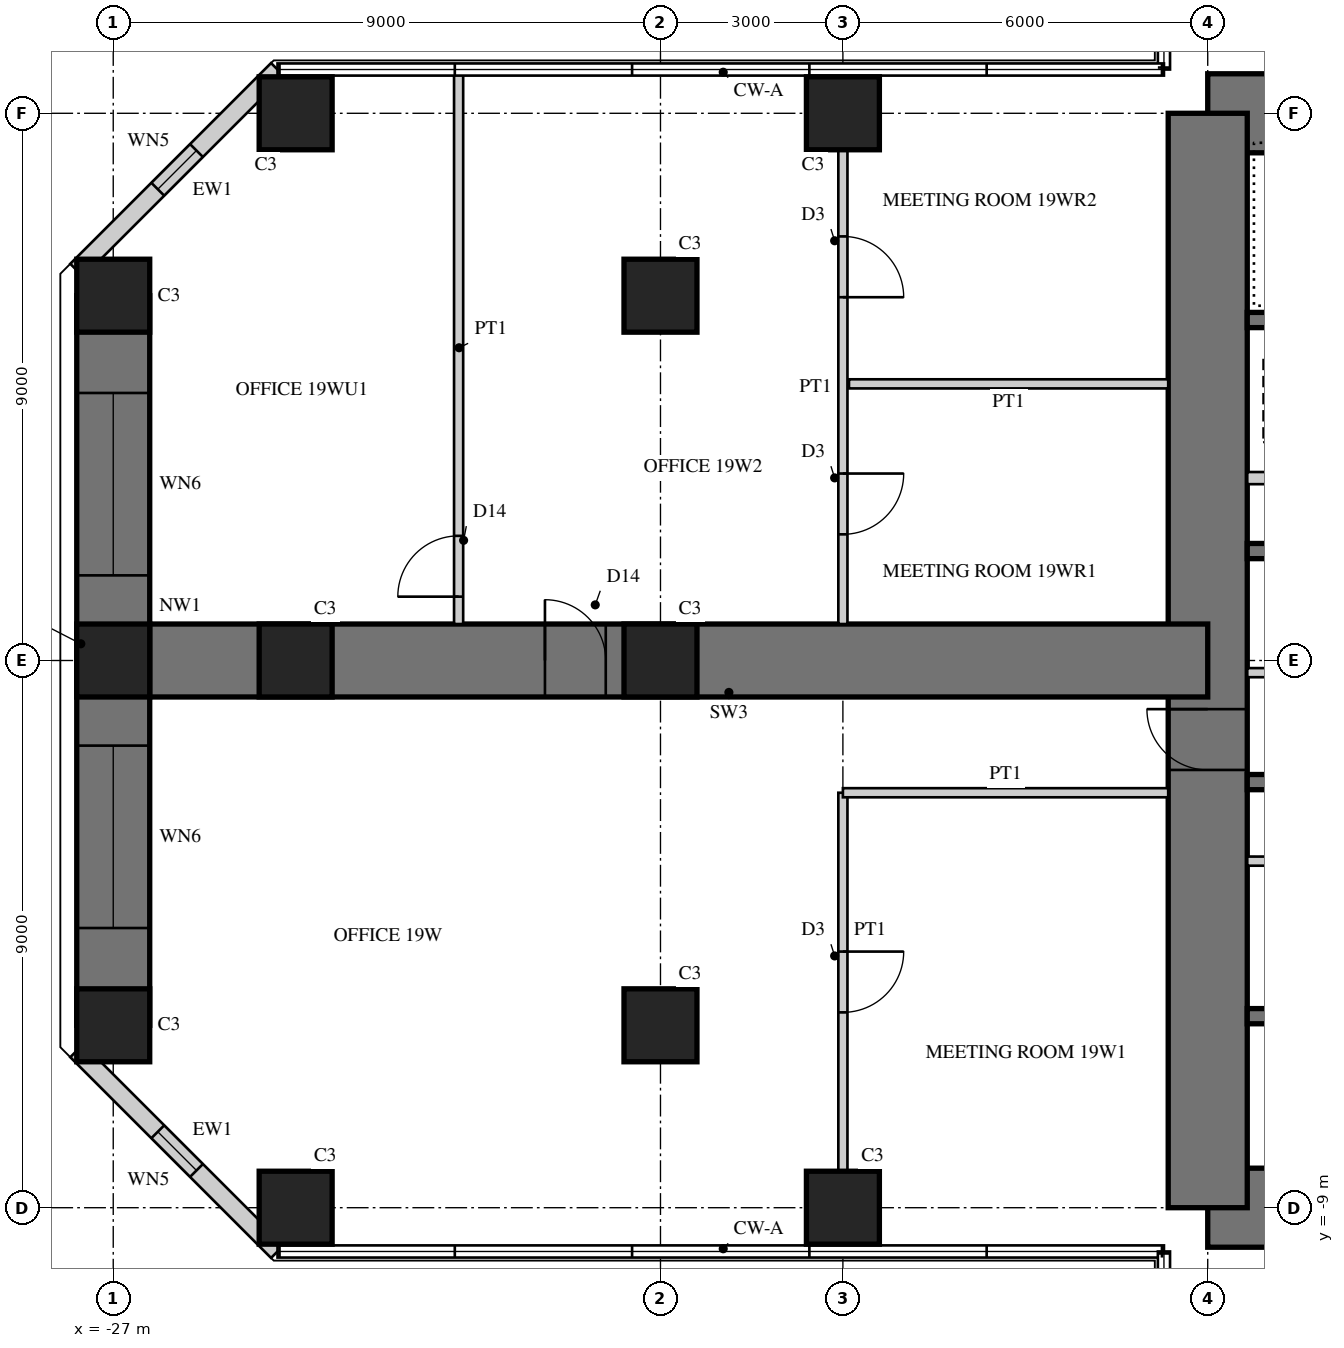
"""IFC4 building model, lengths in metres.
Left out: names, types, materials, properties, quantities, classifications, styles, units other than length and angle.
Written with IfcOpenShell. Run it as: python <this file> out.ifc"""

import sys

from ifc_helpers import new_model, si_unit, direction, frame, frame_2d, origin, origin_2d, place, context, subcontext, project, spatial, rectangle, hollow_rectangle, extrude, element, fill, save


model = new_model("IFC4")
c1 = context("Model", 3, precision=1e-05, world=origin(), true_north=direction((0.0, 1.0)))
c2 = subcontext(c1, "Body", "Model", "MODEL_VIEW")
j1 = project(units=[si_unit("LENGTHUNIT", "METRE"), si_unit("PLANEANGLEUNIT", "RADIAN")], contexts=[c1])
p1 = place(None, origin())
s1 = spatial("IfcSite", under=j1, at=p1, CompositionType="ELEMENT")
p2 = place(p1, origin())
s2 = spatial("IfcBuilding", under=s1, at=p2, CompositionType="ELEMENT")
p3 = place(p2, frame((0.0, 0.0, 79.5)))
s3 = spatial("IfcBuildingStorey", under=s2, at=p3, CompositionType="ELEMENT", Elevation=79.5)
p4 = place(p3, frame((9.0, 9.0, 0.0), z_axis=(0.0, 0.0, 1.0), x_axis=(-1.0, 0.0, 0.0)))
e1 = element("IfcWall", 1, at=p4, inside=s3, PredefinedType="SHEAR", context=c2, shape_type="SweptSolid", body=[
    extrude(rectangle(XDim=18.0, YDim=1.3, at=frame_2d((9.0, 0.0))), origin(), (0.0, 0.0, 1.0), 4.0),
])
p5 = place(p4, frame((9.8, 0.0, 0.0)))
e2 = element("IfcOpeningElement", 2, at=p5, cuts=e1, PredefinedType="OPENING", context=c2, shape_type="SweptSolid", body=[
    extrude(rectangle(XDim=1.0, YDim=2.4, at=frame_2d((0.5, 1.2))), frame((0.0, 0.66, 0.0), z_axis=(0.0, -1.0, 0.0), x_axis=(1.0, 0.0, 0.0)), (0.0, 0.0, 1.0), 1.32),
])
p6 = place(p3, frame((-9.0, -9.0, 0.0), z_axis=(0.0, 0.0, 1.0), x_axis=(1.0, 0.0, 0.0)))
e3 = element("IfcWall", 3, at=p6, inside=s3, PredefinedType="SHEAR", context=c2, shape_type="SweptSolid", body=[
    extrude(rectangle(XDim=18.0, YDim=1.3, at=frame_2d((9.0, 0.0))), origin(), (0.0, 0.0, 1.0), 4.0),
])
p7 = place(p6, frame((9.8, 0.0, 0.0)))
e4 = element("IfcOpeningElement", 4, at=p7, cuts=e3, PredefinedType="OPENING", context=c2, shape_type="SweptSolid", body=[
    extrude(rectangle(XDim=1.0, YDim=2.4, at=frame_2d((0.5, 1.2))), frame((0.0, 0.66, 0.0), z_axis=(0.0, -1.0, 0.0), x_axis=(1.0, 0.0, 0.0)), (0.0, 0.0, 1.0), 1.32),
])
p8 = place(p3, frame((-9.0, 9.0, 0.0), z_axis=(0.0, 0.0, 1.0), x_axis=(0.0, -1.0, 0.0)))
e5 = element("IfcWall", 5, at=p8, inside=s3, PredefinedType="SHEAR", context=c2, shape_type="SweptSolid", body=[
    extrude(rectangle(XDim=18.0, YDim=1.3, at=frame_2d((9.0, 0.0))), origin(), (0.0, 0.0, 1.0), 4.0),
])
p9 = place(p8, frame((9.8, 0.0, 0.0)))
e6 = element("IfcOpeningElement", 6, at=p9, cuts=e5, PredefinedType="OPENING", context=c2, shape_type="SweptSolid", body=[
    extrude(rectangle(XDim=1.0, YDim=2.4, at=frame_2d((0.5, 1.2))), frame((0.0, 0.66, 0.0), z_axis=(0.0, -1.0, 0.0), x_axis=(1.0, 0.0, 0.0)), (0.0, 0.0, 1.0), 1.32),
])
p10 = place(p3, frame((-2.125, 1.8, 0.0), z_axis=(0.0, 0.0, 1.0), x_axis=(-1.0, 0.0, 0.0)))
e7 = element("IfcWall", 7, at=p10, inside=s3, PredefinedType="SHEAR", context=c2, shape_type="SweptSolid", body=[
    extrude(rectangle(XDim=6.225, YDim=0.25, at=frame_2d((3.113, 0.0))), origin(), (0.0, 0.0, 1.0), 4.0),
])
p11 = place(p3, frame((-2.125, 5.6, 0.0), z_axis=(0.0, 0.0, 1.0), x_axis=(-1.0, 0.0, 0.0)))
e8 = element("IfcWall", 8, at=p11, inside=s3, PredefinedType="SHEAR", context=c2, shape_type="SweptSolid", body=[
    extrude(rectangle(XDim=6.225, YDim=0.25, at=frame_2d((3.113, 0.0))), origin(), (0.0, 0.0, 1.0), 4.0),
])
p12 = place(p11, frame((0.175, 0.0, 0.0)))
e9 = element("IfcOpeningElement", 9, at=p12, cuts=e8, PredefinedType="OPENING", context=c2, shape_type="SweptSolid", body=[
    extrude(rectangle(XDim=1.0, YDim=2.1, at=frame_2d((0.5, 1.05))), frame((0.0, 0.135, 0.0), z_axis=(0.0, -1.0, 0.0), x_axis=(1.0, 0.0, 0.0)), (0.0, 0.0, 1.0), 0.27),
])
p13 = place(p3, frame((-5.725, 3.0, 0.0), z_axis=(0.0, 0.0, 1.0), x_axis=(-1.0, 0.0, 0.0)))
e10 = element("IfcWall", 10, at=p13, inside=s3, PredefinedType="PARTITIONING", context=c2, shape_type="SweptSolid", body=[
    extrude(rectangle(XDim=2.625, YDim=0.2, at=frame_2d((1.312, 0.0))), origin(), (0.0, 0.0, 1.0), 4.0),
])
for number, where, z_axis, x_axis in (
    (11, (-1.925, -2.0, 0.0), (0.0, 0.0, 1.0), (-1.0, 0.0, 0.0)),
    (12, (-1.925, -5.85, 0.0), (0.0, 0.0, 1.0), (-1.0, 0.0, 0.0)),
):
    element("IfcWall", number, at=place(p3, frame(where, z_axis=z_axis, x_axis=x_axis)), inside=s3, PredefinedType="SHEAR", context=c2, shape_type="SweptSolid", body=[
        extrude(rectangle(XDim=6.425, YDim=0.25, at=frame_2d((3.212, 0.0))), origin(), (0.0, 0.0, 1.0), 4.0),
    ])
p14 = place(p3, frame((-1.925, -3.3, 0.0), z_axis=(0.0, 0.0, 1.0), x_axis=(-1.0, 0.0, 0.0)))
e13 = element("IfcWall", 13, at=p14, inside=s3, PredefinedType="PARTITIONING", context=c2, shape_type="SweptSolid", body=[
    extrude(rectangle(XDim=6.425, YDim=0.15, at=frame_2d((3.212, 0.0))), origin(), (0.0, 0.0, 1.0), 4.0),
])
p15 = place(p14, frame((0.075, 0.0, 0.0)))
e14 = element("IfcOpeningElement", 14, at=p15, cuts=e13, PredefinedType="OPENING", context=c2, shape_type="SweptSolid", body=[
    extrude(rectangle(XDim=0.8, YDim=2.1, at=frame_2d((0.4, 1.05))), frame((0.0, 0.085, 0.0), z_axis=(0.0, -1.0, 0.0), x_axis=(1.0, 0.0, 0.0)), (0.0, 0.0, 1.0), 0.17),
])
p16 = place(p14, frame((3.675, 0.0, 0.0)))
e15 = element("IfcOpeningElement", 15, at=p16, cuts=e13, PredefinedType="OPENING", context=c2, shape_type="SweptSolid", body=[
    extrude(rectangle(XDim=0.8, YDim=2.1, at=frame_2d((0.4, 1.05))), frame((0.0, 0.085, 0.0), z_axis=(0.0, -1.0, 0.0), x_axis=(1.0, 0.0, 0.0)), (0.0, 0.0, 1.0), 0.17),
])
p17 = place(p3, frame((-9.0, 0.0, 0.0), z_axis=(0.0, 0.0, 1.0), x_axis=(-1.0, 0.0, 0.0)))
e16 = element("IfcWall", 16, at=p17, inside=s3, PredefinedType="SHEAR", context=c2, shape_type="SweptSolid", body=[
    extrude(rectangle(XDim=18.0, YDim=1.2, at=frame_2d((9.0, 0.0))), origin(), (0.0, 0.0, 1.0), 4.0),
])
p18 = place(p17, frame((9.9, 0.0, 0.0)))
e17 = element("IfcOpeningElement", 17, at=p18, cuts=e16, PredefinedType="OPENING", context=c2, shape_type="SweptSolid", body=[
    extrude(rectangle(XDim=1.0, YDim=2.2, at=frame_2d((0.5, 1.1))), frame((0.0, 0.61, 0.0), z_axis=(0.0, -1.0, 0.0), x_axis=(1.0, 0.0, 0.0)), (0.0, 0.0, 1.0), 1.22),
])
p19 = place(p3, frame((-27.0, 6.0, 0.0), z_axis=(0.0, 0.0, 1.0), x_axis=(0.0, -1.0, 0.0)))
e18 = element("IfcWall", 18, at=p19, inside=s3, PredefinedType="SHEAR", context=c2, shape_type="SweptSolid", body=[
    extrude(rectangle(XDim=12.0, YDim=1.2, at=frame_2d((6.0, 0.0))), origin(), (0.0, 0.0, 1.0), 4.0),
])
p20 = place(p19, frame((1.6, 0.0, 0.6)))
e19 = element("IfcOpeningElement", 19, at=p20, cuts=e18, PredefinedType="OPENING", context=c2, shape_type="SweptSolid", body=[
    extrude(rectangle(XDim=3.0, YDim=2.4, at=frame_2d((1.5, 1.2))), frame((0.0, 0.61, 0.0), z_axis=(0.0, -1.0, 0.0), x_axis=(1.0, 0.0, 0.0)), (0.0, 0.0, 1.0), 1.22),
])
p21 = place(p19, frame((7.4, 0.0, 0.6)))
e20 = element("IfcOpeningElement", 20, at=p21, cuts=e18, PredefinedType="OPENING", context=c2, shape_type="SweptSolid", body=[
    extrude(rectangle(XDim=3.0, YDim=2.4, at=frame_2d((1.5, 1.2))), frame((0.0, 0.61, 0.0), z_axis=(0.0, -1.0, 0.0), x_axis=(1.0, 0.0, 0.0)), (0.0, 0.0, 1.0), 1.22),
])
for number, where, z_axis, x_axis in (
    (21, (-15.0, 9.0, 0.0), (0.0, 0.0, 1.0), (1.0, 0.0, 0.0)),
    (22, (-24.0, 9.0, 0.0), (0.0, 0.0, 1.0), (1.0, 0.0, 0.0)),
    (23, (-15.0, -9.0, 0.0), (0.0, 0.0, 1.0), (1.0, 0.0, 0.0)),
    (24, (-24.0, -9.0, 0.0), (0.0, 0.0, 1.0), (1.0, 0.0, 0.0)),
    (25, (-27.0, 6.0, 0.0), (0.0, 0.0, 1.0), (1.0, 0.0, 0.0)),
    (26, (-27.0, 0.0, 0.0), (0.0, 0.0, 1.0), (1.0, 0.0, 0.0)),
    (27, (-27.0, -6.0, 0.0), (0.0, 0.0, 1.0), (1.0, 0.0, 0.0)),
    (28, (-18.0, 6.0, 0.0), (0.0, 0.0, 1.0), (1.0, 0.0, 0.0)),
    (29, (-18.0, 0.0, 0.0), (0.0, 0.0, 1.0), (1.0, 0.0, 0.0)),
    (30, (-18.0, -6.0, 0.0), (0.0, 0.0, 1.0), (1.0, 0.0, 0.0)),
    (31, (-24.0, 0.0, 0.0), (0.0, 0.0, 1.0), (1.0, 0.0, 0.0)),
):
    element("IfcColumn", number, at=place(p3, frame(where, z_axis=z_axis, x_axis=x_axis)), inside=s3, PredefinedType="COLUMN", context=c2, shape_type="SweptSolid", body=[
        extrude(rectangle(XDim=1.2, YDim=1.2, at=origin_2d()), origin(), (0.0, 0.0, 1.0), 4.0),
    ])
p22 = place(p3, frame((-24.298, 9.72, 0.0), z_axis=(0.0, 0.0, 1.0), x_axis=(-0.707106781187, -0.707106781187, 0.0)))
e32 = element("IfcWall", 32, at=p22, inside=s3, PredefinedType="SOLIDWALL", context=c2, shape_type="SweptSolid", body=[
    extrude(rectangle(XDim=4.669, YDim=0.3, at=frame_2d((2.335, 0.0))), origin(), (0.0, 0.0, 1.0), 3.8),
])
p23 = place(p22, frame((1.885, 0.0, 0.3)))
e33 = element("IfcOpeningElement", 33, at=p23, cuts=e32, PredefinedType="OPENING", context=c2, shape_type="SweptSolid", body=[
    extrude(rectangle(XDim=0.9, YDim=2.4, at=frame_2d((0.45, 1.2))), frame((0.0, 0.16, 0.0), z_axis=(0.0, -1.0, 0.0), x_axis=(1.0, 0.0, 0.0)), (0.0, 0.0, 1.0), 0.32),
])
p24 = place(p3, frame((-27.6, -6.418, 0.0), z_axis=(0.0, 0.0, 1.0), x_axis=(0.707106781187, -0.707106781187, 0.0)))
e34 = element("IfcWall", 34, at=p24, inside=s3, PredefinedType="SOLIDWALL", context=c2, shape_type="SweptSolid", body=[
    extrude(rectangle(XDim=4.669, YDim=0.3, at=frame_2d((2.335, 0.0))), origin(), (0.0, 0.0, 1.0), 3.8),
])
p25 = place(p24, frame((1.885, 0.0, 0.3)))
e35 = element("IfcOpeningElement", 35, at=p25, cuts=e34, PredefinedType="OPENING", context=c2, shape_type="SweptSolid", body=[
    extrude(rectangle(XDim=0.9, YDim=2.4, at=frame_2d((0.45, 1.2))), frame((0.0, 0.16, 0.0), z_axis=(0.0, -1.0, 0.0), x_axis=(1.0, 0.0, 0.0)), (0.0, 0.0, 1.0), 0.32),
])
p26 = place(p3, frame((-2.325, -0.2, 0.0), z_axis=(0.0, 0.0, 1.0), x_axis=(-1.0, 0.0, 0.0)))
e36 = element("IfcWall", 36, at=p26, inside=s3, PredefinedType="PARTITIONING", context=c2, shape_type="SweptSolid", body=[
    extrude(rectangle(XDim=6.025, YDim=0.15, at=frame_2d((3.013, 0.0))), origin(), (0.0, 0.0, 1.0), 3.8),
])
p27 = place(p26, frame((0.4, 0.0, 0.0)))
e37 = element("IfcOpeningElement", 37, at=p27, cuts=e36, PredefinedType="OPENING", context=c2, shape_type="SweptSolid", body=[
    extrude(rectangle(XDim=1.0, YDim=2.1, at=frame_2d((0.5, 1.05))), frame((0.0, 0.085, 0.0), z_axis=(0.0, -1.0, 0.0), x_axis=(1.0, 0.0, 0.0)), (0.0, 0.0, 1.0), 0.17),
])
p28 = place(p3, frame((-15.0, -2.175, 0.0), z_axis=(0.0, 0.0, 1.0), x_axis=(0.0, -1.0, 0.0)))
e38 = element("IfcWall", 38, at=p28, inside=s3, PredefinedType="PARTITIONING", context=c2, shape_type="SweptSolid", body=[
    extrude(rectangle(XDim=6.225, YDim=0.15, at=frame_2d((3.112, 0.0))), origin(), (0.0, 0.0, 1.0), 2.95),
])
p29 = place(p28, frame((2.613, 0.0, 0.0)))
e39 = element("IfcOpeningElement", 39, at=p29, cuts=e38, PredefinedType="OPENING", context=c2, shape_type="SweptSolid", body=[
    extrude(rectangle(XDim=1.0, YDim=2.1, at=frame_2d((0.5, 1.05))), frame((0.0, 0.085, 0.0), z_axis=(0.0, -1.0, 0.0), x_axis=(1.0, 0.0, 0.0)), (0.0, 0.0, 1.0), 0.17),
])
p30 = place(p3, frame((-9.65, -2.175, 0.0), z_axis=(0.0, 0.0, 1.0), x_axis=(-1.0, 0.0, 0.0)))
e40 = element("IfcWall", 40, at=p30, inside=s3, PredefinedType="PARTITIONING", context=c2, shape_type="SweptSolid", body=[
    extrude(rectangle(XDim=5.35, YDim=0.15, at=frame_2d((2.675, 0.0))), origin(), (0.0, 0.0, 1.0), 3.8),
])
p31 = place(p3, frame((-15.0, 8.4, 0.0), z_axis=(0.0, 0.0, 1.0), x_axis=(0.0, -1.0, 0.0)))
e41 = element("IfcWall", 41, at=p31, inside=s3, PredefinedType="PARTITIONING", context=c2, shape_type="SweptSolid", body=[
    extrude(rectangle(XDim=7.8, YDim=0.15, at=frame_2d((3.9, 0.0))), origin(), (0.0, 0.0, 1.0), 2.95),
])
p32 = place(p31, frame((1.425, 0.0, 0.0)))
e42 = element("IfcOpeningElement", 42, at=p32, cuts=e41, PredefinedType="OPENING", context=c2, shape_type="SweptSolid", body=[
    extrude(rectangle(XDim=1.0, YDim=2.1, at=frame_2d((0.5, 1.05))), frame((0.0, 0.085, 0.0), z_axis=(0.0, -1.0, 0.0), x_axis=(1.0, 0.0, 0.0)), (0.0, 0.0, 1.0), 0.17),
])
p33 = place(p31, frame((5.325, 0.0, 0.0)))
e43 = element("IfcOpeningElement", 43, at=p33, cuts=e41, PredefinedType="OPENING", context=c2, shape_type="SweptSolid", body=[
    extrude(rectangle(XDim=1.0, YDim=2.1, at=frame_2d((0.5, 1.05))), frame((0.0, 0.085, 0.0), z_axis=(0.0, -1.0, 0.0), x_axis=(1.0, 0.0, 0.0)), (0.0, 0.0, 1.0), 0.17),
])
p34 = place(p3, frame((-9.65, 4.55, 0.0), z_axis=(0.0, 0.0, 1.0), x_axis=(-1.0, 0.0, 0.0)))
e44 = element("IfcWall", 44, at=p34, inside=s3, PredefinedType="PARTITIONING", context=c2, shape_type="SweptSolid", body=[
    extrude(rectangle(XDim=5.25, YDim=0.15, at=frame_2d((2.625, 0.0))), origin(), (0.0, 0.0, 1.0), 3.8),
])
p35 = place(p3, frame((-21.32, 9.68, 0.0), z_axis=(0.0, 0.0, 1.0), x_axis=(0.0, -1.0, 0.0)))
e45 = element("IfcWall", 45, at=p35, inside=s3, PredefinedType="PARTITIONING", context=c2, shape_type="SweptSolid", body=[
    extrude(rectangle(XDim=9.08, YDim=0.15, at=frame_2d((4.54, 0.0))), origin(), (0.0, 0.0, 1.0), 3.8),
])
p36 = place(p35, frame((7.63, 0.0, 0.0)))
e46 = element("IfcOpeningElement", 46, at=p36, cuts=e45, PredefinedType="OPENING", context=c2, shape_type="SweptSolid", body=[
    extrude(rectangle(XDim=1.0, YDim=2.2, at=frame_2d((0.5, 1.1))), frame((0.0, 0.085, 0.0), z_axis=(0.0, -1.0, 0.0), x_axis=(1.0, 0.0, 0.0)), (0.0, 0.0, 1.0), 0.17),
])
p37 = place(p23, origin())
e47 = element("IfcWindow", 47, at=p37, inside=s3, PartitioningType="SINGLE_PANEL", PredefinedType="WINDOW", context=c2, shape_type="SweptSolid", body=[
    extrude(hollow_rectangle(XDim=0.9, YDim=2.4, WallThickness=0.06, at=frame_2d((0.45, 1.2))), frame((0.0, 0.03, 0.0), z_axis=(0.0, -1.0, 0.0), x_axis=(1.0, 0.0, 0.0)), (0.0, 0.0, 1.0), 0.06),
    extrude(rectangle(XDim=0.779, YDim=2.279, at=frame_2d((0.45, 1.2))), frame((0.0, 0.03, 0.0), z_axis=(0.0, -1.0, 0.0), x_axis=(1.0, 0.0, 0.0)), (0.0, 0.0, 1.0), 0.06),
])
fill(e33, e47)
p38 = place(p20, origin())
e48 = element("IfcWindow", 48, at=p38, inside=s3, PartitioningType="SINGLE_PANEL", PredefinedType="WINDOW", context=c2, shape_type="SweptSolid", body=[
    extrude(hollow_rectangle(XDim=3.0, YDim=2.4, WallThickness=0.06, at=frame_2d((1.5, 1.2))), frame((0.0, 0.03, 0.0), z_axis=(0.0, -1.0, 0.0), x_axis=(1.0, 0.0, 0.0)), (0.0, 0.0, 1.0), 0.06),
    extrude(rectangle(XDim=2.879, YDim=2.279, at=frame_2d((1.5, 1.2))), frame((0.0, 0.03, 0.0), z_axis=(0.0, -1.0, 0.0), x_axis=(1.0, 0.0, 0.0)), (0.0, 0.0, 1.0), 0.06),
])
fill(e19, e48)
p39 = place(p21, origin())
e49 = element("IfcWindow", 49, at=p39, inside=s3, PartitioningType="SINGLE_PANEL", PredefinedType="WINDOW", context=c2, shape_type="SweptSolid", body=[
    extrude(hollow_rectangle(XDim=3.0, YDim=2.4, WallThickness=0.06, at=frame_2d((1.5, 1.2))), frame((0.0, 0.03, 0.0), z_axis=(0.0, -1.0, 0.0), x_axis=(1.0, 0.0, 0.0)), (0.0, 0.0, 1.0), 0.06),
    extrude(rectangle(XDim=2.879, YDim=2.279, at=frame_2d((1.5, 1.2))), frame((0.0, 0.03, 0.0), z_axis=(0.0, -1.0, 0.0), x_axis=(1.0, 0.0, 0.0)), (0.0, 0.0, 1.0), 0.06),
])
fill(e20, e49)
p40 = place(p25, origin())
e50 = element("IfcWindow", 50, at=p40, inside=s3, PartitioningType="SINGLE_PANEL", PredefinedType="WINDOW", context=c2, shape_type="SweptSolid", body=[
    extrude(hollow_rectangle(XDim=0.9, YDim=2.4, WallThickness=0.06, at=frame_2d((0.45, 1.2))), frame((0.0, 0.03, 0.0), z_axis=(0.0, -1.0, 0.0), x_axis=(1.0, 0.0, 0.0)), (0.0, 0.0, 1.0), 0.06),
    extrude(rectangle(XDim=0.779, YDim=2.279, at=frame_2d((0.45, 1.2))), frame((0.0, 0.03, 0.0), z_axis=(0.0, -1.0, 0.0), x_axis=(1.0, 0.0, 0.0)), (0.0, 0.0, 1.0), 0.06),
])
fill(e35, e50)
p41 = place(p29, origin())
e51 = element("IfcDoor", 51, at=p41, inside=s3, OperationType="SINGLE_SWING_LEFT", PredefinedType="DOOR", context=c2, shape_type="SweptSolid", body=[
    extrude(rectangle(XDim=1.0, YDim=2.1, at=frame_2d((0.5, 1.05))), frame((0.0, 0.025, 0.0), z_axis=(0.0, -1.0, 0.0), x_axis=(1.0, 0.0, 0.0)), (0.0, 0.0, 1.0), 0.05),
])
fill(e39, e51)
p42 = place(p32, origin())
e52 = element("IfcDoor", 52, at=p42, inside=s3, OperationType="SINGLE_SWING_RIGHT", PredefinedType="DOOR", context=c2, shape_type="SweptSolid", body=[
    extrude(rectangle(XDim=1.0, YDim=2.1, at=frame_2d((0.5, 1.05))), frame((0.0, 0.025, 0.0), z_axis=(0.0, -1.0, 0.0), x_axis=(1.0, 0.0, 0.0)), (0.0, 0.0, 1.0), 0.05),
])
fill(e42, e52)
p43 = place(p33, origin())
e53 = element("IfcDoor", 53, at=p43, inside=s3, OperationType="SINGLE_SWING_LEFT", PredefinedType="DOOR", context=c2, shape_type="SweptSolid", body=[
    extrude(rectangle(XDim=1.0, YDim=2.1, at=frame_2d((0.5, 1.05))), frame((0.0, 0.025, 0.0), z_axis=(0.0, -1.0, 0.0), x_axis=(1.0, 0.0, 0.0)), (0.0, 0.0, 1.0), 0.05),
])
fill(e43, e53)
p44 = place(p36, frame((1.0, 0.0, 0.0), z_axis=(0.0, 0.0, 1.0), x_axis=(-1.0, 0.0, 0.0)))
e54 = element("IfcDoor", 54, at=p44, inside=s3, OperationType="SINGLE_SWING_LEFT", PredefinedType="DOOR", context=c2, shape_type="SweptSolid", body=[
    extrude(rectangle(XDim=1.0, YDim=2.2, at=frame_2d((0.5, 1.1))), frame((0.0, 0.025, 0.0), z_axis=(0.0, -1.0, 0.0), x_axis=(1.0, 0.0, 0.0)), (0.0, 0.0, 1.0), 0.05),
])
fill(e46, e54)
p45 = place(p18, frame((1.0, 0.0, 0.0), z_axis=(0.0, 0.0, 1.0), x_axis=(-1.0, 0.0, 0.0)))
e55 = element("IfcDoor", 55, at=p45, inside=s3, OperationType="SINGLE_SWING_LEFT", PredefinedType="DOOR", context=c2, shape_type="SweptSolid", body=[
    extrude(rectangle(XDim=1.0, YDim=2.2, at=frame_2d((0.5, 1.1))), frame((0.0, 0.025, 0.0), z_axis=(0.0, -1.0, 0.0), x_axis=(1.0, 0.0, 0.0)), (0.0, 0.0, 1.0), 0.05),
])
fill(e17, e55)
p46 = place(p9, frame((1.0, 0.0, 0.0), z_axis=(0.0, 0.0, 1.0), x_axis=(-1.0, 0.0, 0.0)))
e56 = element("IfcDoor", 56, at=p46, inside=s3, OperationType="SINGLE_SWING_RIGHT", PredefinedType="DOOR", context=c2, shape_type="SweptSolid", body=[
    extrude(rectangle(XDim=1.0, YDim=2.4, at=frame_2d((0.5, 1.2))), frame((0.0, -0.005, 0.0), z_axis=(0.0, -1.0, 0.0), x_axis=(1.0, 0.0, 0.0)), (0.0, 0.0, 1.0), 0.05),
])
fill(e6, e56)
save(model, sys.argv[1])
